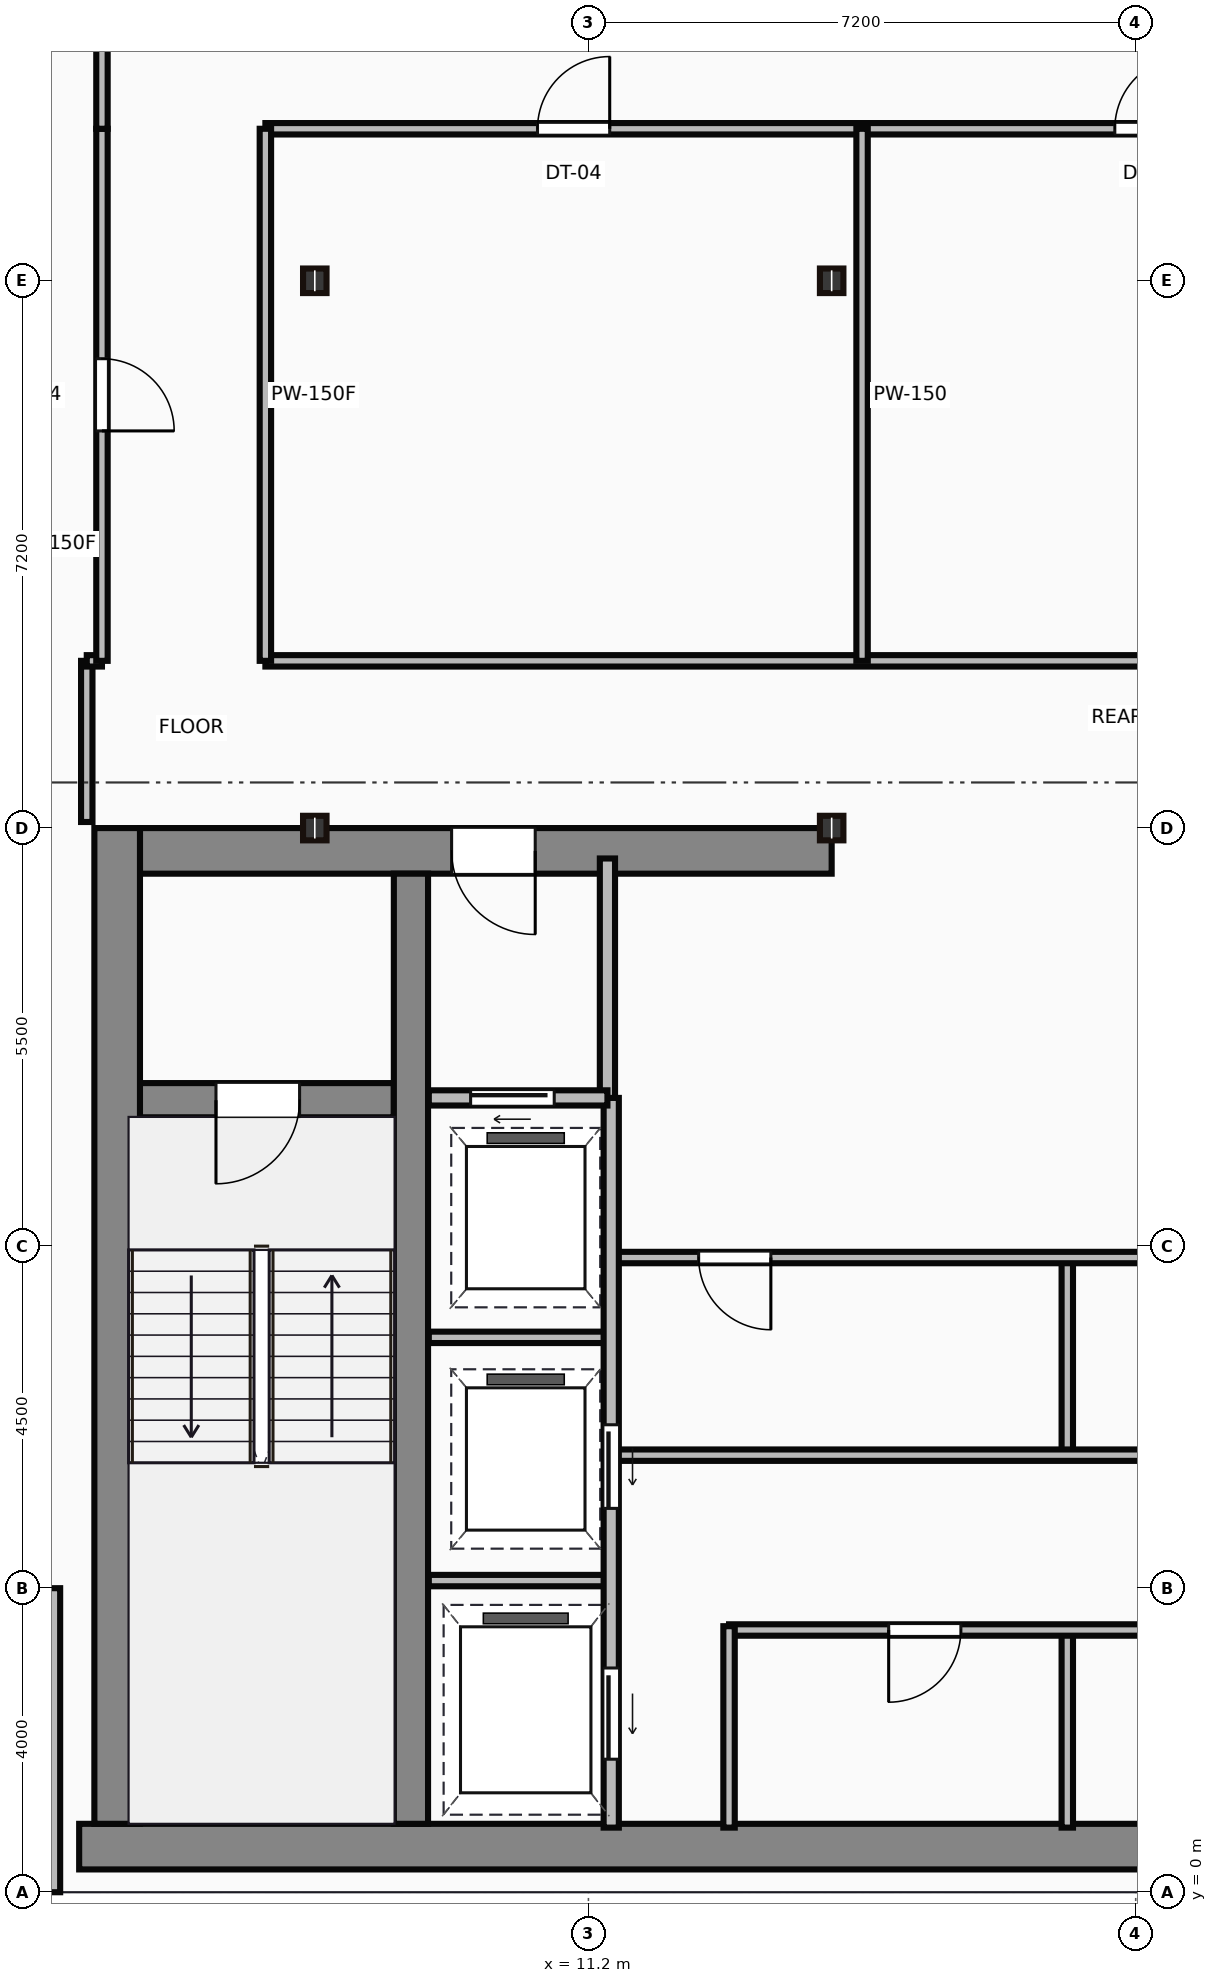
"""IFC4 building model, lengths in metres.
Left out: names, types, materials, properties, quantities, classifications, styles, units other than length and angle.
Written with IfcOpenShell. Run it as: python <this file> out.ifc"""

import sys

from ifc_helpers import new_model, si_unit, direction, frame, frame_2d, origin, origin_2d, place, context, subcontext, project, spatial, rectangle, i_section, extrude, source, transform, mapped, element, fill, save


model = new_model("IFC4")
c1 = context("Model", 3, precision=1e-05, world=origin(), true_north=direction((0.0, 1.0)))
c2 = subcontext(c1, "Body", "Model", "MODEL_VIEW")
j1 = project(units=[si_unit("LENGTHUNIT", "METRE"), si_unit("PLANEANGLEUNIT", "RADIAN")], contexts=[c1])
p1 = place(None, origin())
s1 = spatial("IfcSite", under=j1, at=p1, CompositionType="ELEMENT")
p2 = place(p1, origin())
s2 = spatial("IfcBuilding", under=s1, at=p2, CompositionType="ELEMENT")
p3 = place(p2, frame((0.0, 0.0, 251.5)))
s3 = spatial("IfcBuildingStorey", under=s2, at=p3, CompositionType="ELEMENT", Elevation=251.5)
m1 = source(origin(), c2, "Body", "SweptSolid", [
    extrude(rectangle(XDim=29.5, YDim=0.6, at=frame_2d((14.75, 0.0))), origin(), (0.0, 0.0, 1.0), 3.65),
])
p4 = place(p3, frame((4.5, 0.6, 0.0), z_axis=(0.0, 0.0, 1.0), x_axis=(1.0, 0.0, 0.0)))
e1 = element("IfcWall", 1, at=p4, inside=s3, PredefinedType="SHEAR", context=c2, shape_type="MappedRepresentation", body=[
    mapped(m1, transform((0.0, 0.0, 0.0))),
])
m2 = source(origin(), c2, "Body", "SweptSolid", [
    extrude(rectangle(XDim=13.1, YDim=0.6, at=frame_2d((6.55, 0.0))), origin(), (0.0, 0.0, 1.0), 3.65),
])
p5 = place(p3, frame((5.0, 0.9, 0.0), z_axis=(0.0, 0.0, 1.0), x_axis=(0.0, 1.0, 0.0)))
e2 = element("IfcWall", 2, at=p5, inside=s3, PredefinedType="SHEAR", context=c2, shape_type="MappedRepresentation", body=[
    mapped(m2, transform((0.0, 0.0, 0.0))),
])
m3 = source(origin(), c2, "Body", "SweptSolid", [
    extrude(rectangle(XDim=9.1, YDim=0.6, at=frame_2d((4.55, 0.0))), origin(), (0.0, 0.0, 1.0), 3.65),
])
p6 = place(p3, frame((5.3, 13.7, 0.0), z_axis=(0.0, 0.0, 1.0), x_axis=(1.0, 0.0, 0.0)))
e3 = element("IfcWall", 3, at=p6, inside=s3, PredefinedType="SHEAR", context=c2, shape_type="MappedRepresentation", body=[
    mapped(m3, transform((0.0, 0.0, 0.0))),
])
p7 = place(p6, frame((4.1, 0.0, 0.0)))
e4 = element("IfcOpeningElement", 4, at=p7, cuts=e3, PredefinedType="OPENING", context=c2, shape_type="SweptSolid", body=[
    extrude(rectangle(XDim=1.1, YDim=2.15, at=frame_2d((0.55, 1.075))), frame((0.0, 0.31, 0.0), z_axis=(0.0, -1.0, 0.0), x_axis=(1.0, 0.0, 0.0)), (0.0, 0.0, 1.0), 0.62),
])
m4 = source(origin(), c2, "Body", "SweptSolid", [
    extrude(rectangle(XDim=12.5, YDim=0.45, at=frame_2d((6.25, 0.0))), origin(), (0.0, 0.0, 1.0), 3.65),
])
p8 = place(p3, frame((8.865, 0.9, 0.0), z_axis=(0.0, 0.0, 1.0), x_axis=(0.0, 1.0, 0.0)))
e5 = element("IfcWall", 5, at=p8, inside=s3, PredefinedType="SHEAR", context=c2, shape_type="MappedRepresentation", body=[
    mapped(m4, transform((0.0, 0.0, 0.0))),
])
m5 = source(origin(), c2, "Body", "SweptSolid", [
    extrude(rectangle(XDim=3.39, YDim=0.45, at=frame_2d((1.695, 0.0))), origin(), (0.0, 0.0, 1.0), 3.65),
])
p9 = place(p3, frame((5.25, 10.42, 0.0), z_axis=(0.0, 0.0, 1.0), x_axis=(1.0, 0.0, 0.0)))
e6 = element("IfcWall", 6, at=p9, inside=s3, PredefinedType="SHEAR", context=c2, shape_type="MappedRepresentation", body=[
    mapped(m5, transform((0.0, 0.0, 0.0))),
])
p10 = place(p9, frame((1.05, 0.0, 0.0)))
e7 = element("IfcOpeningElement", 7, at=p10, cuts=e6, PredefinedType="OPENING", context=c2, shape_type="SweptSolid", body=[
    extrude(rectangle(XDim=1.1, YDim=2.15, at=frame_2d((0.55, 1.075))), frame((0.0, 0.235, 0.0), z_axis=(0.0, -1.0, 0.0), x_axis=(1.0, 0.0, 0.0)), (0.0, 0.0, 1.0), 0.47),
])
m6 = source(origin(), c2, "Body", "SweptSolid", [
    extrude(i_section(OverallWidth=0.309, OverallDepth=0.323, WebThickness=0.014, FlangeThickness=0.023, at=origin_2d()), origin(), (0.0, 0.0, 1.0), 3.65),
])
for number, where, z_axis, x_axis in (
    (8, (7.6, 14.0, 0.0), (0.0, 0.0, 1.0), (1.0, 0.0, 0.0)),
    (9, (7.6, 21.2, 0.0), (0.0, 0.0, 1.0), (1.0, 0.0, 0.0)),
    (10, (14.4, 14.0, 0.0), (0.0, 0.0, 1.0), (1.0, 0.0, 0.0)),
    (11, (14.4, 21.2, 0.0), (0.0, 0.0, 1.0), (1.0, 0.0, 0.0)),
):
    element("IfcColumn", number, at=place(p3, frame(where, z_axis=z_axis, x_axis=x_axis)), inside=s3, PredefinedType="COLUMN", context=c2, shape_type="MappedRepresentation", body=[
        mapped(m6, transform((0.0, 0.0, 0.0))),
    ])
m7 = source(origin(), c2, "Body", "SweptSolid", [
    extrude(rectangle(XDim=4.0, YDim=0.25, at=frame_2d((2.0, 0.0))), origin(), (0.0, 0.0, 1.0), 3.4),
])
p11 = place(p3, frame((4.125, 4.0, 0.0), z_axis=(0.0, 0.0, 1.0), x_axis=(0.0, -1.0, 0.0)))
e12 = element("IfcWall", 12, at=p11, inside=s3, PredefinedType="STANDARD", context=c2, shape_type="MappedRepresentation", body=[
    mapped(m7, transform((0.0, 0.0, 0.0))),
])
m8 = source(origin(), c2, "Body", "SweptSolid", [
    extrude(rectangle(XDim=3.18, YDim=0.2, at=frame_2d((1.59, 0.0))), origin(), (0.0, 0.0, 1.0), 3.4),
])
p12 = place(p3, frame((11.45, 10.42, 0.0), z_axis=(0.0, 0.0, 1.0), x_axis=(0.0, 1.0, 0.0)))
e13 = element("IfcWall", 13, at=p12, inside=s3, PredefinedType="PARTITIONING", context=c2, shape_type="MappedRepresentation", body=[
    mapped(m8, transform((0.0, 0.0, 0.0))),
])
m9 = source(origin(), c2, "Body", "SweptSolid", [
    extrude(rectangle(XDim=2.35, YDim=0.2, at=frame_2d((1.175, 0.0))), origin(), (0.0, 0.0, 1.0), 3.4),
])
p13 = place(p3, frame((9.1, 10.45, 0.0), z_axis=(0.0, 0.0, 1.0), x_axis=(1.0, 0.0, 0.0)))
e14 = element("IfcWall", 14, at=p13, inside=s3, PredefinedType="PARTITIONING", context=c2, shape_type="MappedRepresentation", body=[
    mapped(m9, transform((0.0, 0.0, 0.0))),
])
p14 = place(p13, frame((0.55, 0.0, 0.0)))
e15 = element("IfcOpeningElement", 15, at=p14, cuts=e14, PredefinedType="OPENING", context=c2, shape_type="SweptSolid", body=[
    extrude(rectangle(XDim=1.1, YDim=2.15, at=frame_2d((0.55, 1.075))), frame((0.0, 0.11, 0.0), z_axis=(0.0, -1.0, 0.0), x_axis=(1.0, 0.0, 0.0)), (0.0, 0.0, 1.0), 0.22),
])
m10 = source(origin(), c2, "Body", "SweptSolid", [
    extrude(rectangle(XDim=9.6, YDim=0.2, at=frame_2d((4.8, 0.0))), origin(), (0.0, 0.0, 1.0), 3.4),
])
p15 = place(p3, frame((11.5, 0.85, 0.0), z_axis=(0.0, 0.0, 1.0), x_axis=(0.0, 1.0, 0.0)))
e16 = element("IfcWall", 16, at=p15, inside=s3, PredefinedType="PARTITIONING", context=c2, shape_type="MappedRepresentation", body=[
    mapped(m10, transform((0.0, 0.0, 0.0))),
])
p16 = place(p15, frame((4.2, 0.0, 0.0)))
e17 = element("IfcOpeningElement", 17, at=p16, cuts=e16, PredefinedType="OPENING", context=c2, shape_type="SweptSolid", body=[
    extrude(rectangle(XDim=1.1, YDim=2.15, at=frame_2d((0.55, 1.075))), frame((0.0, 0.11, 0.0), z_axis=(0.0, -1.0, 0.0), x_axis=(1.0, 0.0, 0.0)), (0.0, 0.0, 1.0), 0.22),
])
p17 = place(p15, frame((0.9, 0.0, 0.0)))
e18 = element("IfcOpeningElement", 18, at=p17, cuts=e16, PredefinedType="OPENING", context=c2, shape_type="SweptSolid", body=[
    extrude(rectangle(XDim=1.2, YDim=2.15, at=frame_2d((0.6, 1.075))), frame((0.0, 0.11, 0.0), z_axis=(0.0, -1.0, 0.0), x_axis=(1.0, 0.0, 0.0)), (0.0, 0.0, 1.0), 0.22),
])
m11 = source(origin(), c2, "Body", "SweptSolid", [
    extrude(rectangle(XDim=2.4, YDim=0.15, at=frame_2d((1.2, 0.0))), origin(), (0.0, 0.0, 1.0), 3.4),
])
for number, where, z_axis, x_axis in (
    (19, (9.1, 4.1, 0.0), (0.0, 0.0, 1.0), (1.0, 0.0, 0.0)),
    (20, (9.1, 7.3, 0.0), (0.0, 0.0, 1.0), (1.0, 0.0, 0.0)),
):
    element("IfcWall", number, at=place(p3, frame(where, z_axis=z_axis, x_axis=x_axis)), inside=s3, PredefinedType="PARTITIONING", context=c2, shape_type="MappedRepresentation", body=[
        mapped(m11, transform((0.0, 0.0, 0.0))),
    ])
m12 = source(origin(), c2, "Body", "SweptSolid", [
    extrude(rectangle(XDim=2.65, YDim=0.15, at=frame_2d((1.325, 0.0))), origin(), (0.0, 0.0, 1.0), 3.4),
])
p18 = place(p3, frame((13.05, 0.85, 0.0), z_axis=(0.0, 0.0, 1.0), x_axis=(0.0, 1.0, 0.0)))
e21 = element("IfcWall", 21, at=p18, inside=s3, PredefinedType="PARTITIONING", context=c2, shape_type="MappedRepresentation", body=[
    mapped(m12, transform((0.0, 0.0, 0.0))),
])
m13 = source(origin(), c2, "Body", "SweptSolid", [
    extrude(rectangle(XDim=10.35, YDim=0.15, at=frame_2d((5.175, 0.0))), origin(), (0.0, 0.0, 1.0), 3.4),
])
p19 = place(p3, frame((13.05, 3.45, 0.0), z_axis=(0.0, 0.0, 1.0), x_axis=(1.0, 0.0, 0.0)))
e22 = element("IfcWall", 22, at=p19, inside=s3, PredefinedType="PARTITIONING", context=c2, shape_type="MappedRepresentation", body=[
    mapped(m13, transform((0.0, 0.0, 0.0))),
])
p20 = place(p19, frame((2.1, 0.0, 0.0)))
e23 = element("IfcOpeningElement", 23, at=p20, cuts=e22, PredefinedType="OPENING", context=c2, shape_type="SweptSolid", body=[
    extrude(rectangle(XDim=0.95, YDim=2.15, at=frame_2d((0.475, 1.075))), frame((0.0, 0.085, 0.0), z_axis=(0.0, -1.0, 0.0), x_axis=(1.0, 0.0, 0.0)), (0.0, 0.0, 1.0), 0.17),
])
p21 = place(p19, frame((6.8, 0.0, 0.0)))
e24 = element("IfcOpeningElement", 24, at=p21, cuts=e22, PredefinedType="OPENING", context=c2, shape_type="SweptSolid", body=[
    extrude(rectangle(XDim=0.95, YDim=2.15, at=frame_2d((0.475, 1.075))), frame((0.0, 0.085, 0.0), z_axis=(0.0, -1.0, 0.0), x_axis=(1.0, 0.0, 0.0)), (0.0, 0.0, 1.0), 0.17),
])
m14 = source(origin(), c2, "Body", "SweptSolid", [
    extrude(rectangle(XDim=2.6, YDim=0.15, at=frame_2d((1.3, 0.0))), origin(), (0.0, 0.0, 1.0), 3.4),
])
p22 = place(p3, frame((17.5, 0.85, 0.0), z_axis=(0.0, 0.0, 1.0), x_axis=(0.0, 1.0, 0.0)))
e25 = element("IfcWall", 25, at=p22, inside=s3, PredefinedType="PARTITIONING", context=c2, shape_type="MappedRepresentation", body=[
    mapped(m14, transform((0.0, 0.0, 0.0))),
])
m15 = source(origin(), c2, "Body", "SweptSolid", [
    extrude(rectangle(XDim=11.85, YDim=0.15, at=frame_2d((5.925, 0.0))), origin(), (0.0, 0.0, 1.0), 3.4),
])
p23 = place(p3, frame((11.55, 5.75, 0.0), z_axis=(0.0, 0.0, 1.0), x_axis=(1.0, 0.0, 0.0)))
e26 = element("IfcWall", 26, at=p23, inside=s3, PredefinedType="PARTITIONING", context=c2, shape_type="MappedRepresentation", body=[
    mapped(m15, transform((0.0, 0.0, 0.0))),
])
p24 = place(p3, frame((11.55, 8.35, 0.0), z_axis=(0.0, 0.0, 1.0), x_axis=(1.0, 0.0, 0.0)))
e27 = element("IfcWall", 27, at=p24, inside=s3, PredefinedType="PARTITIONING", context=c2, shape_type="MappedRepresentation", body=[
    mapped(m15, transform((0.0, 0.0, 0.0))),
])
p25 = place(p24, frame((1.1, 0.0, 0.0)))
e28 = element("IfcOpeningElement", 28, at=p25, cuts=e27, PredefinedType="OPENING", context=c2, shape_type="SweptSolid", body=[
    extrude(rectangle(XDim=0.95, YDim=2.15, at=frame_2d((0.475, 1.075))), frame((0.0, 0.085, 0.0), z_axis=(0.0, -1.0, 0.0), x_axis=(1.0, 0.0, 0.0)), (0.0, 0.0, 1.0), 0.17),
])
p26 = place(p24, frame((9.4, 0.0, 0.0)))
e29 = element("IfcOpeningElement", 29, at=p26, cuts=e27, PredefinedType="OPENING", context=c2, shape_type="SweptSolid", body=[
    extrude(rectangle(XDim=0.95, YDim=2.15, at=frame_2d((0.475, 1.075))), frame((0.0, 0.085, 0.0), z_axis=(0.0, -1.0, 0.0), x_axis=(1.0, 0.0, 0.0)), (0.0, 0.0, 1.0), 0.17),
])
m16 = source(origin(), c2, "Body", "SweptSolid", [
    extrude(rectangle(XDim=2.5, YDim=0.15, at=frame_2d((1.25, 0.0))), origin(), (0.0, 0.0, 1.0), 3.4),
])
p27 = place(p3, frame((17.5, 5.8, 0.0), z_axis=(0.0, 0.0, 1.0), x_axis=(0.0, 1.0, 0.0)))
e30 = element("IfcWall", 30, at=p27, inside=s3, PredefinedType="PARTITIONING", context=c2, shape_type="MappedRepresentation", body=[
    mapped(m16, transform((0.0, 0.0, 0.0))),
])
m17 = source(origin(), c2, "Body", "SweptSolid", [
    extrude(rectangle(XDim=2.12, YDim=0.15, at=frame_2d((1.06, 0.0))), origin(), (0.0, 0.0, 1.0), 3.4),
])
p28 = place(p3, frame((4.6, 14.08, 0.0), z_axis=(0.0, 0.0, 1.0), x_axis=(0.0, 1.0, 0.0)))
e31 = element("IfcWall", 31, at=p28, inside=s3, PredefinedType="PARTITIONING", context=c2, shape_type="MappedRepresentation", body=[
    mapped(m17, transform((0.0, 0.0, 0.0))),
])
m18 = source(origin(), c2, "Body", "SweptSolid", [
    extrude(rectangle(XDim=0.2, YDim=0.15, at=frame_2d((0.1, 0.0))), origin(), (0.0, 0.0, 1.0), 3.4),
])
p29 = place(p3, frame((4.6, 16.2, 0.0), z_axis=(0.0, 0.0, 1.0), x_axis=(1.0, 0.0, 0.0)))
e32 = element("IfcWall", 32, at=p29, inside=s3, PredefinedType="PARTITIONING", context=c2, shape_type="MappedRepresentation", body=[
    mapped(m18, transform((0.0, 0.0, 0.0))),
])
m19 = source(origin(), c2, "Body", "SweptSolid", [
    extrude(rectangle(XDim=7.0, YDim=0.15, at=frame_2d((3.5, 0.0))), origin(), (0.0, 0.0, 1.0), 3.4),
])
p30 = place(p3, frame((4.8, 16.2, 0.0), z_axis=(0.0, 0.0, 1.0), x_axis=(0.0, 1.0, 0.0)))
e33 = element("IfcWall", 33, at=p30, inside=s3, PredefinedType="PARTITIONING", context=c2, shape_type="MappedRepresentation", body=[
    mapped(m19, transform((0.0, 0.0, 0.0))),
])
p31 = place(p30, frame((3.025, 0.0, 0.0)))
e34 = element("IfcOpeningElement", 34, at=p31, cuts=e33, PredefinedType="OPENING", context=c2, shape_type="SweptSolid", body=[
    extrude(rectangle(XDim=0.95, YDim=2.15, at=frame_2d((0.475, 1.075))), frame((0.0, 0.085, 0.0), z_axis=(0.0, -1.0, 0.0), x_axis=(1.0, 0.0, 0.0)), (0.0, 0.0, 1.0), 0.17),
])
m20 = source(origin(), c2, "Body", "SweptSolid", [
    extrude(rectangle(XDim=2.0, YDim=0.15, at=frame_2d((1.0, 0.0))), origin(), (0.0, 0.0, 1.0), 3.4),
])
p32 = place(p3, frame((4.8, 23.2, 0.0), z_axis=(0.0, 0.0, 1.0), x_axis=(0.0, 1.0, 0.0)))
e35 = element("IfcWall", 35, at=p32, inside=s3, PredefinedType="PARTITIONING", context=c2, shape_type="MappedRepresentation", body=[
    mapped(m20, transform((0.0, 0.0, 0.0))),
])
m21 = source(origin(), c2, "Body", "SweptSolid", [
    extrude(rectangle(XDim=28.65, YDim=0.15, at=frame_2d((14.325, 0.0))), origin(), (0.0, 0.0, 1.0), 3.4),
])
p33 = place(p3, frame((6.95, 16.2, 0.0), z_axis=(0.0, 0.0, 1.0), x_axis=(1.0, 0.0, 0.0)))
e36 = element("IfcWall", 36, at=p33, inside=s3, PredefinedType="PARTITIONING", context=c2, shape_type="MappedRepresentation", body=[
    mapped(m21, transform((0.0, 0.0, 0.0))),
])
p34 = place(p33, frame((21.445, 0.0, 0.0)))
e37 = element("IfcOpeningElement", 37, at=p34, cuts=e36, PredefinedType="OPENING", context=c2, shape_type="SweptSolid", body=[
    extrude(rectangle(XDim=0.95, YDim=2.15, at=frame_2d((0.475, 1.075))), frame((0.0, 0.085, 0.0), z_axis=(0.0, -1.0, 0.0), x_axis=(1.0, 0.0, 0.0)), (0.0, 0.0, 1.0), 0.17),
])
p35 = place(p3, frame((35.6, 23.2, 0.0), z_axis=(0.0, 0.0, 1.0), x_axis=(-1.0, 0.0, 0.0)))
e38 = element("IfcWall", 38, at=p35, inside=s3, PredefinedType="PARTITIONING", context=c2, shape_type="MappedRepresentation", body=[
    mapped(m21, transform((0.0, 0.0, 0.0))),
])
p36 = place(p35, frame((24.12, 0.0, 0.0)))
e39 = element("IfcOpeningElement", 39, at=p36, cuts=e38, PredefinedType="OPENING", context=c2, shape_type="SweptSolid", body=[
    extrude(rectangle(XDim=0.95, YDim=2.15, at=frame_2d((0.475, 1.075))), frame((0.0, 0.085, 0.0), z_axis=(0.0, -1.0, 0.0), x_axis=(1.0, 0.0, 0.0)), (0.0, 0.0, 1.0), 0.17),
])
p37 = place(p35, frame((16.525, 0.0, 0.0)))
e40 = element("IfcOpeningElement", 40, at=p37, cuts=e38, PredefinedType="OPENING", context=c2, shape_type="SweptSolid", body=[
    extrude(rectangle(XDim=0.95, YDim=2.15, at=frame_2d((0.475, 1.075))), frame((0.0, 0.085, 0.0), z_axis=(0.0, -1.0, 0.0), x_axis=(1.0, 0.0, 0.0)), (0.0, 0.0, 1.0), 0.17),
])
for number, where, z_axis, x_axis in (
    (41, (6.95, 23.2, 0.0), (0.0, 0.0, 1.0), (0.0, -1.0, 0.0)),
    (42, (14.8, 23.2, 0.0), (0.0, 0.0, 1.0), (0.0, -1.0, 0.0)),
):
    element("IfcWall", number, at=place(p3, frame(where, z_axis=z_axis, x_axis=x_axis)), inside=s3, PredefinedType="PARTITIONING", context=c2, shape_type="MappedRepresentation", body=[
        mapped(m19, transform((0.0, 0.0, 0.0))),
    ])
m22 = source(origin(), c2, "Body", "SweptSolid", [
    extrude(rectangle(XDim=1.1, YDim=2.15, at=frame_2d((0.55, 1.075))), frame((0.0, 0.025, 0.0), z_axis=(0.0, -1.0, 0.0), x_axis=(1.0, 0.0, 0.0)), (0.0, 0.0, 1.0), 0.05),
])
p38 = place(p10, frame((1.1, 0.0, 0.0), z_axis=(0.0, 0.0, 1.0), x_axis=(-1.0, 0.0, 0.0)))
e43 = element("IfcDoor", 43, at=p38, inside=s3, OperationType="SINGLE_SWING_LEFT", PredefinedType="DOOR", context=c2, shape_type="MappedRepresentation", body=[
    mapped(m22, transform((0.0, 0.0, 0.0))),
])
fill(e7, e43)
p39 = place(p7, origin())
e44 = element("IfcDoor", 44, at=p39, inside=s3, OperationType="SINGLE_SWING_RIGHT", PredefinedType="DOOR", context=c2, shape_type="MappedRepresentation", body=[
    mapped(m22, transform((0.0, 0.0, 0.0))),
])
fill(e4, e44)
p40 = place(p14, origin())
e45 = element("IfcDoor", 45, at=p40, inside=s3, OperationType="SLIDING_TO_LEFT", PredefinedType="DOOR", context=c2, shape_type="MappedRepresentation", body=[
    mapped(m22, transform((0.0, 0.0, 0.0))),
])
fill(e15, e45)
p41 = place(p16, frame((1.1, 0.0, 0.0), z_axis=(0.0, 0.0, 1.0), x_axis=(-1.0, 0.0, 0.0)))
e46 = element("IfcDoor", 46, at=p41, inside=s3, OperationType="SLIDING_TO_LEFT", PredefinedType="DOOR", context=c2, shape_type="MappedRepresentation", body=[
    mapped(m22, transform((0.0, 0.0, 0.0))),
])
fill(e17, e46)
m23 = source(origin(), c2, "Body", "SweptSolid", [
    extrude(rectangle(XDim=1.2, YDim=2.15, at=frame_2d((0.6, 1.075))), frame((0.0, 0.025, 0.0), z_axis=(0.0, -1.0, 0.0), x_axis=(1.0, 0.0, 0.0)), (0.0, 0.0, 1.0), 0.05),
])
p42 = place(p17, frame((1.2, 0.0, 0.0), z_axis=(0.0, 0.0, 1.0), x_axis=(-1.0, 0.0, 0.0)))
e47 = element("IfcDoor", 47, at=p42, inside=s3, OperationType="SLIDING_TO_LEFT", PredefinedType="DOOR", context=c2, shape_type="MappedRepresentation", body=[
    mapped(m23, transform((0.0, 0.0, 0.0))),
])
fill(e18, e47)
m24 = source(origin(), c2, "Body", "SweptSolid", [
    extrude(rectangle(XDim=0.95, YDim=2.15, at=frame_2d((0.475, 1.075))), frame((0.0, 0.025, 0.0), z_axis=(0.0, -1.0, 0.0), x_axis=(1.0, 0.0, 0.0)), (0.0, 0.0, 1.0), 0.05),
])
p43 = place(p20, origin())
e48 = element("IfcDoor", 48, at=p43, inside=s3, OperationType="SINGLE_SWING_LEFT", PredefinedType="DOOR", context=c2, shape_type="MappedRepresentation", body=[
    mapped(m24, transform((0.0, 0.0, 0.0))),
])
fill(e23, e48)
p44 = place(p25, origin())
e49 = element("IfcDoor", 49, at=p44, inside=s3, OperationType="SINGLE_SWING_RIGHT", PredefinedType="DOOR", context=c2, shape_type="MappedRepresentation", body=[
    mapped(m24, transform((0.0, 0.0, 0.0))),
])
fill(e28, e49)
p45 = place(p31, origin())
e50 = element("IfcDoor", 50, at=p45, inside=s3, OperationType="SINGLE_SWING_LEFT", PredefinedType="DOOR", context=c2, shape_type="MappedRepresentation", body=[
    mapped(m24, transform((0.0, 0.0, 0.0))),
])
fill(e34, e50)
p46 = place(p36, origin())
e51 = element("IfcDoor", 51, at=p46, inside=s3, OperationType="SINGLE_SWING_LEFT", PredefinedType="DOOR", context=c2, shape_type="MappedRepresentation", body=[
    mapped(m24, transform((0.0, 0.0, 0.0))),
])
fill(e39, e51)
p47 = place(p37, origin())
e52 = element("IfcDoor", 52, at=p47, inside=s3, OperationType="SINGLE_SWING_LEFT", PredefinedType="DOOR", context=c2, shape_type="MappedRepresentation", body=[
    mapped(m24, transform((0.0, 0.0, 0.0))),
])
fill(e40, e52)
save(model, sys.argv[1])
